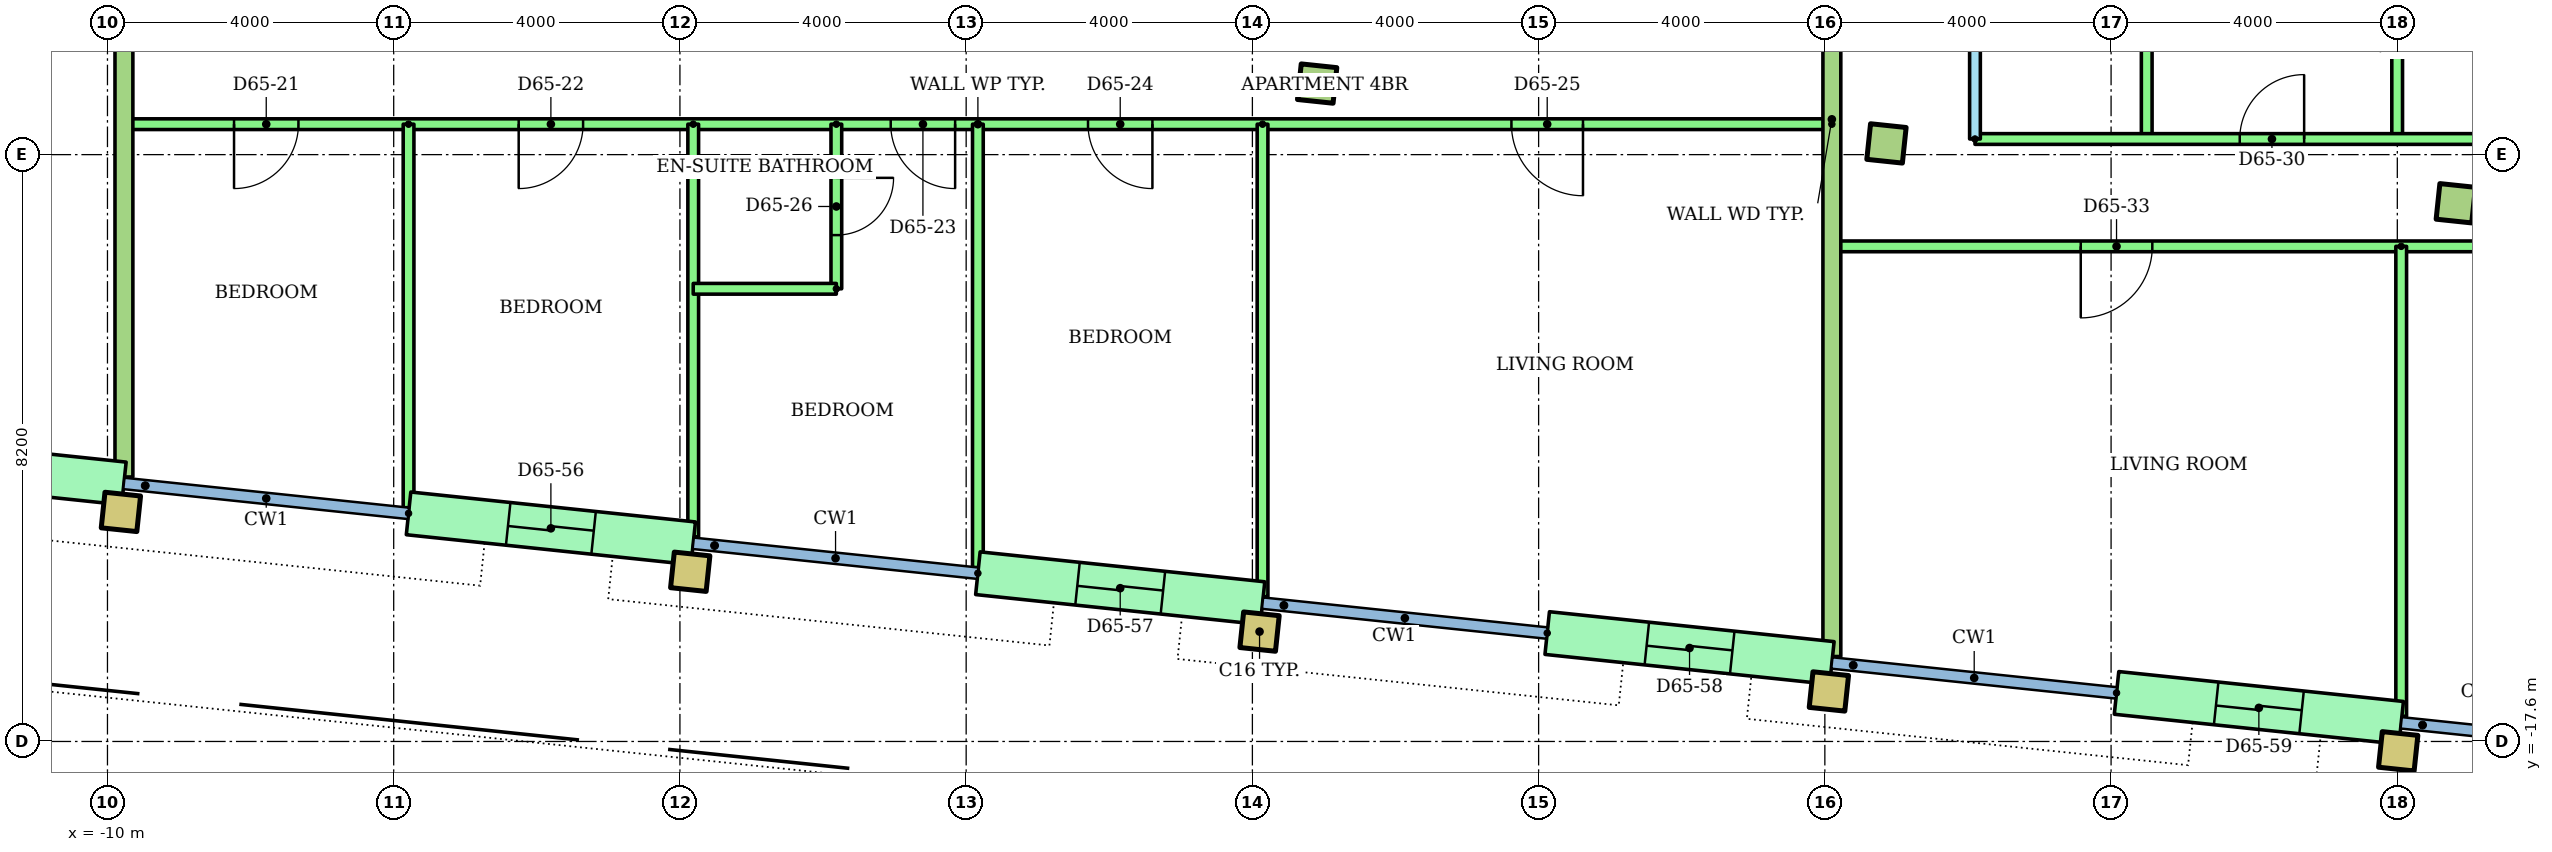
"""IFC4 building model, lengths in metres.
Left out: names, types, materials, properties, quantities, classifications, styles, units other than length and angle.
Written with IfcOpenShell. Run it as: python <this file> out.ifc"""

import sys

from ifc_helpers import new_model, si_unit, direction, frame, frame_2d, origin, origin_2d, place, context, subcontext, project, spatial, rectangle, hollow_rectangle, extrude, element, fill, save


model = new_model("IFC4")
c1 = context("Model", 3, precision=1e-05, world=origin(), true_north=direction((0.0, 1.0)))
c2 = subcontext(c1, "Body", "Model", "MODEL_VIEW")
j1 = project(units=[si_unit("LENGTHUNIT", "METRE"), si_unit("PLANEANGLEUNIT", "RADIAN")], contexts=[c1])
p1 = place(None, origin())
s1 = spatial("IfcSite", under=j1, at=p1, CompositionType="ELEMENT")
p2 = place(p1, origin())
s2 = spatial("IfcBuilding", under=s1, at=p2, CompositionType="ELEMENT")
p3 = place(p2, frame((0.0, 0.0, 253.1)))
s3 = spatial("IfcBuildingStorey", under=s2, at=p3, CompositionType="ELEMENT", Elevation=253.1)
for number, where, z_axis, x_axis in (
    (1, (-9.812, -14.392, 0.0), (0.0, 0.0, 1.0), (0.995, -0.105, 0.0)),
    (2, (-1.856, -15.229, 0.0), (0.0, 0.0, 1.0), (0.995, -0.105, 0.0)),
    (3, (6.1, -16.065, 0.0), (0.0, 0.0, 1.0), (0.995, -0.105, 0.0)),
    (4, (14.056, -16.901, 0.0), (0.0, 0.0, 1.0), (0.995, -0.105, 0.0)),
    (5, (22.012, -17.737, 0.0), (0.0, 0.0, 1.0), (0.995, -0.105, 0.0)),
):
    element("IfcColumn", number, at=place(p3, frame(where, z_axis=z_axis, x_axis=x_axis)), inside=s3, PredefinedType="COLUMN", context=c2, shape_type="SweptSolid", body=[
        extrude(hollow_rectangle(XDim=0.5, YDim=0.5, WallThickness=0.025, at=origin_2d()), origin(), (0.0, 0.0, 1.0), 3.2),
    ])
for number, where, z_axis, x_axis in (
    (6, (6.905, -8.407, 0.0), (0.0, 0.0, 1.0), (0.995, -0.105, 0.0)),
    (7, (14.861, -9.243, 0.0), (0.0, 0.0, 1.0), (0.995, -0.105, 0.0)),
    (8, (22.817, -10.08, 0.0), (0.0, 0.0, 1.0), (0.995, -0.105, 0.0)),
):
    element("IfcColumn", number, at=place(p3, frame(where, z_axis=z_axis, x_axis=x_axis)), inside=s3, PredefinedType="COLUMN", context=c2, shape_type="SweptSolid", body=[
        extrude(rectangle(XDim=0.5, YDim=0.5, at=origin_2d()), origin(), (0.0, 0.0, 1.0), 3.2),
    ])
p4 = place(p3, frame((-13.749, -13.576, 0.0), z_axis=(0.0, 0.0, 1.0), x_axis=(0.994519156568, -0.104554517933, 0.0)))
e9 = element("IfcWall", 9, at=p4, inside=s3, PredefinedType="STANDARD", context=c2, shape_type="SweptSolid", body=[
    extrude(rectangle(XDim=4.0, YDim=0.6, at=frame_2d((2.0, 0.0))), origin(), (0.0, 0.0, 1.0), 2.92),
])
p5 = place(p4, frame((1.4, 0.0, 0.0)))
e10 = element("IfcOpeningElement", 10, at=p5, cuts=e9, PredefinedType="OPENING", context=c2, shape_type="SweptSolid", body=[
    extrude(rectangle(XDim=1.2, YDim=2.1, at=frame_2d((0.6, 1.05))), frame((0.0, 0.31, 0.0), z_axis=(0.0, -1.0, 0.0), x_axis=(1.0, 0.0, 0.0)), (0.0, 0.0, 1.0), 0.62),
])
p6 = place(p3, frame((-5.792, -14.413, 0.0), z_axis=(0.0, 0.0, 1.0), x_axis=(0.99452550138, -0.104494148666, 0.0)))
e11 = element("IfcWall", 11, at=p6, inside=s3, PredefinedType="STANDARD", context=c2, shape_type="SweptSolid", body=[
    extrude(rectangle(XDim=4.0, YDim=0.6, at=frame_2d((2.0, 0.0))), origin(), (0.0, 0.0, 1.0), 2.92),
])
p7 = place(p6, frame((1.4, 0.0, 0.0)))
e12 = element("IfcOpeningElement", 12, at=p7, cuts=e11, PredefinedType="OPENING", context=c2, shape_type="SweptSolid", body=[
    extrude(rectangle(XDim=1.2, YDim=2.1, at=frame_2d((0.6, 1.05))), frame((0.0, 0.31, 0.0), z_axis=(0.0, -1.0, 0.0), x_axis=(1.0, 0.0, 0.0)), (0.0, 0.0, 1.0), 0.62),
])
p8 = place(p3, frame((2.164, -15.249, 0.0), z_axis=(0.0, 0.0, 1.0), x_axis=(0.99452550138, -0.104494148666, 0.0)))
e13 = element("IfcWall", 13, at=p8, inside=s3, PredefinedType="STANDARD", context=c2, shape_type="SweptSolid", body=[
    extrude(rectangle(XDim=4.0, YDim=0.6, at=frame_2d((2.0, 0.0))), origin(), (0.0, 0.0, 1.0), 2.92),
])
p9 = place(p8, frame((1.4, 0.0, 0.0)))
e14 = element("IfcOpeningElement", 14, at=p9, cuts=e13, PredefinedType="OPENING", context=c2, shape_type="SweptSolid", body=[
    extrude(rectangle(XDim=1.2, YDim=2.1, at=frame_2d((0.6, 1.05))), frame((0.0, 0.31, 0.0), z_axis=(0.0, -1.0, 0.0), x_axis=(1.0, 0.0, 0.0)), (0.0, 0.0, 1.0), 0.62),
])
p10 = place(p3, frame((10.12, -16.085, 0.0), z_axis=(0.0, 0.0, 1.0), x_axis=(0.994519156568, -0.104554517933, 0.0)))
e15 = element("IfcWall", 15, at=p10, inside=s3, PredefinedType="STANDARD", context=c2, shape_type="SweptSolid", body=[
    extrude(rectangle(XDim=4.0, YDim=0.6, at=frame_2d((2.0, 0.0))), origin(), (0.0, 0.0, 1.0), 2.92),
])
p11 = place(p10, frame((1.4, 0.0, 0.0)))
e16 = element("IfcOpeningElement", 16, at=p11, cuts=e15, PredefinedType="OPENING", context=c2, shape_type="SweptSolid", body=[
    extrude(rectangle(XDim=1.2, YDim=2.1, at=frame_2d((0.6, 1.05))), frame((0.0, 0.31, 0.0), z_axis=(0.0, -1.0, 0.0), x_axis=(1.0, 0.0, 0.0)), (0.0, 0.0, 1.0), 0.62),
])
p12 = place(p3, frame((18.076, -16.921, 0.0), z_axis=(0.0, 0.0, 1.0), x_axis=(0.994519156568, -0.104554517933, 0.0)))
e17 = element("IfcWall", 17, at=p12, inside=s3, PredefinedType="STANDARD", context=c2, shape_type="SweptSolid", body=[
    extrude(rectangle(XDim=4.0, YDim=0.6, at=frame_2d((2.0, 0.0))), origin(), (0.0, 0.0, 1.0), 2.92),
])
p13 = place(p12, frame((1.4, 0.0, 0.0)))
e18 = element("IfcOpeningElement", 18, at=p13, cuts=e17, PredefinedType="OPENING", context=c2, shape_type="SweptSolid", body=[
    extrude(rectangle(XDim=1.2, YDim=2.1, at=frame_2d((0.6, 1.05))), frame((0.0, 0.31, 0.0), z_axis=(0.0, -1.0, 0.0), x_axis=(1.0, 0.0, 0.0)), (0.0, 0.0, 1.0), 0.62),
])
p14 = place(p3, frame((14.098, -8.975, 0.0), z_axis=(0.0, 0.0, 1.0), x_axis=(-1.0, 0.0, 0.0)))
e19 = element("IfcWall", 19, at=p14, inside=s3, PredefinedType="PARTITIONING", context=c2, shape_type="SweptSolid", body=[
    extrude(rectangle(XDim=23.868, YDim=0.15, at=frame_2d((11.934, 0.0))), origin(), (0.0, 0.0, 1.0), 2.4),
])
p15 = place(p14, frame((21.429, 0.0, 0.0)))
e20 = element("IfcOpeningElement", 20, at=p15, cuts=e19, PredefinedType="OPENING", context=c2, shape_type="SweptSolid", body=[
    extrude(rectangle(XDim=0.9, YDim=2.1, at=frame_2d((0.45, 1.05))), frame((0.0, 0.085, 0.0), z_axis=(0.0, -1.0, 0.0), x_axis=(1.0, 0.0, 0.0)), (0.0, 0.0, 1.0), 0.17),
])
p16 = place(p14, frame((17.451, 0.0, 0.0)))
e21 = element("IfcOpeningElement", 21, at=p16, cuts=e19, PredefinedType="OPENING", context=c2, shape_type="SweptSolid", body=[
    extrude(rectangle(XDim=0.9, YDim=2.1, at=frame_2d((0.45, 1.05))), frame((0.0, 0.085, 0.0), z_axis=(0.0, -1.0, 0.0), x_axis=(1.0, 0.0, 0.0)), (0.0, 0.0, 1.0), 0.17),
])
p17 = place(p14, frame((12.252, 0.0, 0.0)))
e22 = element("IfcOpeningElement", 22, at=p17, cuts=e19, PredefinedType="OPENING", context=c2, shape_type="SweptSolid", body=[
    extrude(rectangle(XDim=0.9, YDim=2.1, at=frame_2d((0.45, 1.05))), frame((0.0, 0.085, 0.0), z_axis=(0.0, -1.0, 0.0), x_axis=(1.0, 0.0, 0.0)), (0.0, 0.0, 1.0), 0.17),
])
p18 = place(p14, frame((9.495, 0.0, 0.0)))
e23 = element("IfcOpeningElement", 23, at=p18, cuts=e19, PredefinedType="OPENING", context=c2, shape_type="SweptSolid", body=[
    extrude(rectangle(XDim=0.9, YDim=2.1, at=frame_2d((0.45, 1.05))), frame((0.0, 0.085, 0.0), z_axis=(0.0, -1.0, 0.0), x_axis=(1.0, 0.0, 0.0)), (0.0, 0.0, 1.0), 0.17),
])
p19 = place(p14, frame((3.478, 0.0, 0.0)))
e24 = element("IfcOpeningElement", 24, at=p19, cuts=e19, PredefinedType="OPENING", context=c2, shape_type="SweptSolid", body=[
    extrude(rectangle(XDim=1.0, YDim=2.1, at=frame_2d((0.5, 1.05))), frame((0.0, 0.085, 0.0), z_axis=(0.0, -1.0, 0.0), x_axis=(1.0, 0.0, 0.0)), (0.0, 0.0, 1.0), 0.17),
])
p20 = place(p3, frame((-5.792, -8.975, 0.0), z_axis=(0.0, 0.0, 1.0), x_axis=(0.0, -1.0, 0.0)))
e25 = element("IfcWall", 25, at=p20, inside=s3, PredefinedType="PARTITIONING", context=c2, shape_type="SweptSolid", body=[
    extrude(rectangle(XDim=5.359, YDim=0.15, at=frame_2d((2.679, 0.0))), origin(), (0.0, 0.0, 1.0), 2.4),
])
p21 = place(p3, frame((-1.814, -8.975, 0.0), z_axis=(0.0, 0.0, 1.0), x_axis=(0.0, -1.0, 0.0)))
e26 = element("IfcWall", 26, at=p21, inside=s3, PredefinedType="PARTITIONING", context=c2, shape_type="SweptSolid", body=[
    extrude(rectangle(XDim=5.766, YDim=0.15, at=frame_2d((2.883, 0.0))), origin(), (0.0, 0.0, 1.0), 2.4),
])
p22 = place(p3, frame((2.164, -8.975, 0.0), z_axis=(0.0, 0.0, 1.0), x_axis=(0.0, -1.0, 0.0)))
e27 = element("IfcWall", 27, at=p22, inside=s3, PredefinedType="PARTITIONING", context=c2, shape_type="SweptSolid", body=[
    extrude(rectangle(XDim=6.195, YDim=0.15, at=frame_2d((3.097, 0.0))), origin(), (0.0, 0.0, 1.0), 2.4),
])
p23 = place(p3, frame((6.142, -8.975, 0.0), z_axis=(0.0, 0.0, 1.0), x_axis=(0.0, -1.0, 0.0)))
e28 = element("IfcWall", 28, at=p23, inside=s3, PredefinedType="PARTITIONING", context=c2, shape_type="SweptSolid", body=[
    extrude(rectangle(XDim=6.602, YDim=0.15, at=frame_2d((3.301, 0.0))), origin(), (0.0, 0.0, 1.0), 2.4),
])
p24 = place(p3, frame((0.186, -8.975, 0.0), z_axis=(0.0, 0.0, 1.0), x_axis=(0.0, -1.0, 0.0)))
e29 = element("IfcWall", 29, at=p24, inside=s3, PredefinedType="PARTITIONING", context=c2, shape_type="SweptSolid", body=[
    extrude(rectangle(XDim=2.3, YDim=0.15, at=frame_2d((1.15, 0.0))), origin(), (0.0, 0.0, 1.0), 2.4),
])
p25 = place(p24, frame((0.75, 0.0, 0.0)))
e30 = element("IfcOpeningElement", 30, at=p25, cuts=e29, PredefinedType="OPENING", context=c2, shape_type="SweptSolid", body=[
    extrude(rectangle(XDim=0.8, YDim=2.1, at=frame_2d((0.4, 1.05))), frame((0.0, 0.085, 0.0), z_axis=(0.0, -1.0, 0.0), x_axis=(1.0, 0.0, 0.0)), (0.0, 0.0, 1.0), 0.17),
])
p26 = place(p3, frame((0.186, -11.274, 0.0), z_axis=(0.0, 0.0, 1.0), x_axis=(-1.0, 0.0, 0.0)))
e31 = element("IfcWall", 31, at=p26, inside=s3, PredefinedType="PARTITIONING", context=c2, shape_type="SweptSolid", body=[
    extrude(rectangle(XDim=2.0, YDim=0.15, at=frame_2d((1.0, 0.0))), origin(), (0.0, 0.0, 1.0), 2.4),
])
p27 = place(p3, frame((-9.77, -1.4, 0.0), z_axis=(0.0, 0.0, 1.0), x_axis=(0.0, -1.0, 0.0)))
e32 = element("IfcWall", 32, at=p27, inside=s3, PredefinedType="PARTITIONING", context=c2, shape_type="SweptSolid", body=[
    extrude(rectangle(XDim=12.504, YDim=0.25, at=frame_2d((6.252, 0.0))), origin(), (0.0, 0.0, 1.0), 2.4),
])
p28 = place(p3, frame((16.098, -1.4, 0.0), z_axis=(0.0, 0.0, 1.0), x_axis=(0.0, -1.0, 0.0)))
e33 = element("IfcWall", 33, at=p28, inside=s3, PredefinedType="PARTITIONING", context=c2, shape_type="SweptSolid", body=[
    extrude(rectangle(XDim=7.782, YDim=0.15, at=frame_2d((3.891, 0.0))), origin(), (0.0, 0.0, 1.0), 2.4),
])
p29 = place(p28, frame((1.675, 0.0, 0.0)))
e34 = element("IfcOpeningElement", 34, at=p29, cuts=e33, PredefinedType="OPENING", context=c2, shape_type="SweptSolid", body=[
    extrude(rectangle(XDim=0.9, YDim=2.1, at=frame_2d((0.45, 1.05))), frame((0.0, 0.085, 0.0), z_axis=(0.0, -1.0, 0.0), x_axis=(1.0, 0.0, 0.0)), (0.0, 0.0, 1.0), 0.17),
])
p30 = place(p28, frame((5.616, 0.0, 0.0)))
e35 = element("IfcOpeningElement", 35, at=p30, cuts=e33, PredefinedType="OPENING", context=c2, shape_type="SweptSolid", body=[
    extrude(rectangle(XDim=0.8, YDim=2.1, at=frame_2d((0.4, 1.05))), frame((0.0, 0.085, 0.0), z_axis=(0.0, -1.0, 0.0), x_axis=(1.0, 0.0, 0.0)), (0.0, 0.0, 1.0), 0.17),
])
for number, where, z_axis, x_axis in (
    (36, (18.498, -1.4, 0.0), (0.0, 0.0, 1.0), (0.0, -1.0, 0.0)),
    (37, (21.998, -1.4, 0.0), (0.0, 0.0, 1.0), (0.0, -1.0, 0.0)),
):
    element("IfcWall", number, at=place(p3, frame(where, z_axis=z_axis, x_axis=x_axis)), inside=s3, PredefinedType="PARTITIONING", context=c2, shape_type="SweptSolid", body=[
        extrude(rectangle(XDim=7.782, YDim=0.15, at=frame_2d((3.891, 0.0))), origin(), (0.0, 0.0, 1.0), 2.4),
    ])
p31 = place(p3, frame((16.098, -9.182, 0.0)))
e38 = element("IfcWall", 38, at=p31, inside=s3, PredefinedType="PARTITIONING", context=c2, shape_type="SweptSolid", body=[
    extrude(rectangle(XDim=13.873, YDim=0.15, at=frame_2d((6.937, 0.0))), origin(), (0.0, 0.0, 1.0), 2.4),
])
p32 = place(p31, frame((3.7, 0.0, 0.0)))
e39 = element("IfcOpeningElement", 39, at=p32, cuts=e38, PredefinedType="OPENING", context=c2, shape_type="SweptSolid", body=[
    extrude(rectangle(XDim=0.9, YDim=2.1, at=frame_2d((0.45, 1.05))), frame((0.0, 0.085, 0.0), z_axis=(0.0, -1.0, 0.0), x_axis=(1.0, 0.0, 0.0)), (0.0, 0.0, 1.0), 0.17),
])
p33 = place(p31, frame((7.7, 0.0, 0.0)))
e40 = element("IfcOpeningElement", 40, at=p33, cuts=e38, PredefinedType="OPENING", context=c2, shape_type="SweptSolid", body=[
    extrude(rectangle(XDim=0.9, YDim=2.1, at=frame_2d((0.45, 1.05))), frame((0.0, 0.085, 0.0), z_axis=(0.0, -1.0, 0.0), x_axis=(1.0, 0.0, 0.0)), (0.0, 0.0, 1.0), 0.17),
])
p34 = place(p31, frame((12.729, 0.0, 0.0)))
e41 = element("IfcOpeningElement", 41, at=p34, cuts=e38, PredefinedType="OPENING", context=c2, shape_type="SweptSolid", body=[
    extrude(rectangle(XDim=0.9, YDim=2.1, at=frame_2d((0.45, 1.05))), frame((0.0, 0.085, 0.0), z_axis=(0.0, -1.0, 0.0), x_axis=(1.0, 0.0, 0.0)), (0.0, 0.0, 1.0), 0.17),
])
p35 = place(p3, frame((29.814, -10.682, 0.0), z_axis=(0.0, 0.0, 1.0), x_axis=(-1.0, 0.0, 0.0)))
e42 = element("IfcWall", 42, at=p35, inside=s3, PredefinedType="PARTITIONING", context=c2, shape_type="SweptSolid", body=[
    extrude(rectangle(XDim=15.716, YDim=0.15, at=frame_2d((7.858, 0.0))), origin(), (0.0, 0.0, 1.0), 2.4),
])
p36 = place(p35, frame((11.238, 0.0, 0.0)))
e43 = element("IfcOpeningElement", 43, at=p36, cuts=e42, PredefinedType="OPENING", context=c2, shape_type="SweptSolid", body=[
    extrude(rectangle(XDim=1.0, YDim=2.1, at=frame_2d((0.5, 1.05))), frame((0.0, 0.085, 0.0), z_axis=(0.0, -1.0, 0.0), x_axis=(1.0, 0.0, 0.0)), (0.0, 0.0, 1.0), 0.17),
])
p37 = place(p35, frame((2.308, 0.0, 0.0)))
e44 = element("IfcOpeningElement", 44, at=p37, cuts=e42, PredefinedType="OPENING", context=c2, shape_type="SweptSolid", body=[
    extrude(rectangle(XDim=0.9, YDim=2.1, at=frame_2d((0.45, 1.05))), frame((0.0, 0.085, 0.0), z_axis=(0.0, -1.0, 0.0), x_axis=(1.0, 0.0, 0.0)), (0.0, 0.0, 1.0), 0.17),
])
p38 = place(p3, frame((22.054, -10.682, 0.0), z_axis=(0.0, 0.0, 1.0), x_axis=(0.0, -1.0, 0.0)))
e45 = element("IfcWall", 45, at=p38, inside=s3, PredefinedType="PARTITIONING", context=c2, shape_type="SweptSolid", body=[
    extrude(rectangle(XDim=6.567, YDim=0.15, at=frame_2d((3.284, 0.0))), origin(), (0.0, 0.0, 1.0), 2.4),
])
p39 = place(p3, frame((14.098, -1.4, 0.0), z_axis=(0.0, 0.0, 1.0), x_axis=(0.0, -1.0, 0.0)))
e46 = element("IfcWall", 46, at=p39, inside=s3, PredefinedType="PARTITIONING", context=c2, shape_type="SweptSolid", body=[
    extrude(rectangle(XDim=15.013, YDim=0.25, at=frame_2d((7.506, 0.0))), origin(), (0.0, 0.0, 1.0), 2.4),
])
p40 = place(p15, origin())
e47 = element("IfcDoor", 47, at=p40, inside=s3, OperationType="SINGLE_SWING_RIGHT", PredefinedType="DOOR", context=c2, shape_type="SweptSolid", body=[
    extrude(rectangle(XDim=0.9, YDim=2.1, at=frame_2d((0.45, 1.05))), frame((0.0, 0.025, 0.0), z_axis=(0.0, -1.0, 0.0), x_axis=(1.0, 0.0, 0.0)), (0.0, 0.0, 1.0), 0.05),
])
fill(e20, e47)
p41 = place(p16, origin())
e48 = element("IfcDoor", 48, at=p41, inside=s3, OperationType="SINGLE_SWING_RIGHT", PredefinedType="DOOR", context=c2, shape_type="SweptSolid", body=[
    extrude(rectangle(XDim=0.9, YDim=2.1, at=frame_2d((0.45, 1.05))), frame((0.0, 0.025, 0.0), z_axis=(0.0, -1.0, 0.0), x_axis=(1.0, 0.0, 0.0)), (0.0, 0.0, 1.0), 0.05),
])
fill(e21, e48)
p42 = place(p17, origin())
e49 = element("IfcDoor", 49, at=p42, inside=s3, OperationType="SINGLE_SWING_LEFT", PredefinedType="DOOR", context=c2, shape_type="SweptSolid", body=[
    extrude(rectangle(XDim=0.9, YDim=2.1, at=frame_2d((0.45, 1.05))), frame((0.0, 0.025, 0.0), z_axis=(0.0, -1.0, 0.0), x_axis=(1.0, 0.0, 0.0)), (0.0, 0.0, 1.0), 0.05),
])
fill(e22, e49)
p43 = place(p18, origin())
e50 = element("IfcDoor", 50, at=p43, inside=s3, OperationType="SINGLE_SWING_LEFT", PredefinedType="DOOR", context=c2, shape_type="SweptSolid", body=[
    extrude(rectangle(XDim=0.9, YDim=2.1, at=frame_2d((0.45, 1.05))), frame((0.0, 0.025, 0.0), z_axis=(0.0, -1.0, 0.0), x_axis=(1.0, 0.0, 0.0)), (0.0, 0.0, 1.0), 0.05),
])
fill(e23, e50)
p44 = place(p19, origin())
e51 = element("IfcDoor", 51, at=p44, inside=s3, OperationType="SINGLE_SWING_LEFT", PredefinedType="DOOR", context=c2, shape_type="SweptSolid", body=[
    extrude(rectangle(XDim=1.0, YDim=2.1, at=frame_2d((0.5, 1.05))), frame((0.0, 0.025, 0.0), z_axis=(0.0, -1.0, 0.0), x_axis=(1.0, 0.0, 0.0)), (0.0, 0.0, 1.0), 0.05),
])
fill(e24, e51)
p45 = place(p25, origin())
e52 = element("IfcDoor", 52, at=p45, inside=s3, OperationType="SINGLE_SWING_LEFT", PredefinedType="DOOR", context=c2, shape_type="SweptSolid", body=[
    extrude(rectangle(XDim=0.8, YDim=2.1, at=frame_2d((0.4, 1.05))), frame((0.0, 0.025, 0.0), z_axis=(0.0, -1.0, 0.0), x_axis=(1.0, 0.0, 0.0)), (0.0, 0.0, 1.0), 0.05),
])
fill(e30, e52)
p46 = place(p32, origin())
e53 = element("IfcDoor", 53, at=p46, inside=s3, OperationType="SINGLE_SWING_RIGHT", PredefinedType="DOOR", context=c2, shape_type="SweptSolid", body=[
    extrude(rectangle(XDim=0.9, YDim=2.1, at=frame_2d((0.45, 1.05))), frame((0.0, 0.025, 0.0), z_axis=(0.0, -1.0, 0.0), x_axis=(1.0, 0.0, 0.0)), (0.0, 0.0, 1.0), 0.05),
])
fill(e39, e53)
p47 = place(p36, origin())
e54 = element("IfcDoor", 54, at=p47, inside=s3, OperationType="SINGLE_SWING_RIGHT", PredefinedType="DOOR", context=c2, shape_type="SweptSolid", body=[
    extrude(rectangle(XDim=1.0, YDim=2.1, at=frame_2d((0.5, 1.05))), frame((0.0, 0.025, 0.0), z_axis=(0.0, -1.0, 0.0), x_axis=(1.0, 0.0, 0.0)), (0.0, 0.0, 1.0), 0.05),
])
fill(e43, e54)
p48 = place(p7, origin())
e55 = element("IfcDoor", 55, at=p48, inside=s3, OperationType="SLIDING_TO_LEFT", PredefinedType="DOOR", context=c2, shape_type="SweptSolid", body=[
    extrude(rectangle(XDim=1.2, YDim=2.1, at=frame_2d((0.6, 1.05))), frame((0.0, 0.025, 0.0), z_axis=(0.0, -1.0, 0.0), x_axis=(1.0, 0.0, 0.0)), (0.0, 0.0, 1.0), 0.05),
])
fill(e12, e55)
p49 = place(p9, origin())
e56 = element("IfcDoor", 56, at=p49, inside=s3, OperationType="SLIDING_TO_LEFT", PredefinedType="DOOR", context=c2, shape_type="SweptSolid", body=[
    extrude(rectangle(XDim=1.2, YDim=2.1, at=frame_2d((0.6, 1.05))), frame((0.0, 0.025, 0.0), z_axis=(0.0, -1.0, 0.0), x_axis=(1.0, 0.0, 0.0)), (0.0, 0.0, 1.0), 0.05),
])
fill(e14, e56)
p50 = place(p11, origin())
e57 = element("IfcDoor", 57, at=p50, inside=s3, OperationType="SLIDING_TO_LEFT", PredefinedType="DOOR", context=c2, shape_type="SweptSolid", body=[
    extrude(rectangle(XDim=1.2, YDim=2.1, at=frame_2d((0.6, 1.05))), frame((0.0, 0.025, 0.0), z_axis=(0.0, -1.0, 0.0), x_axis=(1.0, 0.0, 0.0)), (0.0, 0.0, 1.0), 0.05),
])
fill(e16, e57)
p51 = place(p13, origin())
e58 = element("IfcDoor", 58, at=p51, inside=s3, OperationType="SLIDING_TO_LEFT", PredefinedType="DOOR", context=c2, shape_type="SweptSolid", body=[
    extrude(rectangle(XDim=1.2, YDim=2.1, at=frame_2d((0.6, 1.05))), frame((0.0, 0.025, 0.0), z_axis=(0.0, -1.0, 0.0), x_axis=(1.0, 0.0, 0.0)), (0.0, 0.0, 1.0), 0.05),
])
fill(e18, e58)
save(model, sys.argv[1])
